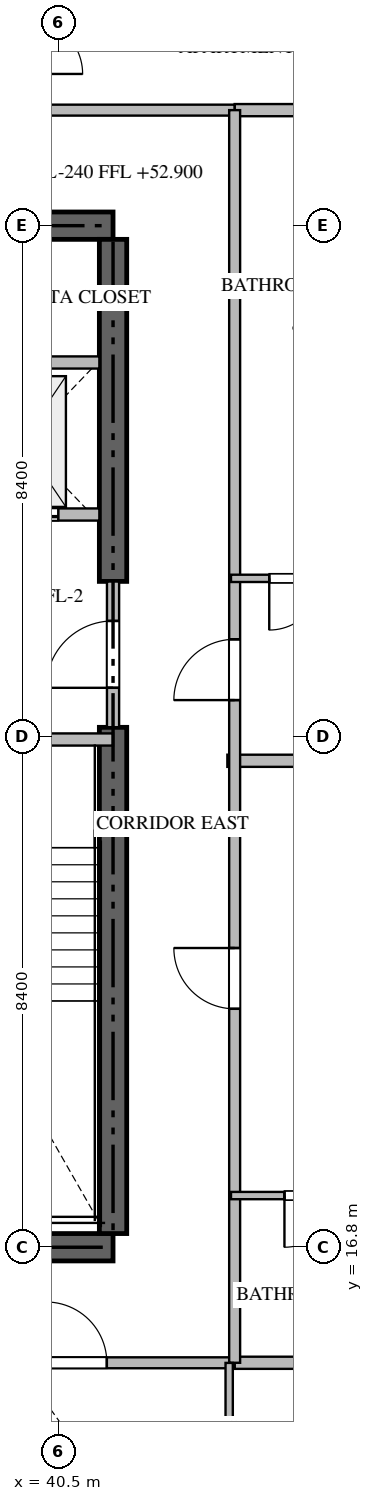
"""IFC4 building model, lengths in metres.
Left out: names, types, materials, properties, quantities, classifications, styles, units other than length and angle.
Written with IfcOpenShell. Run it as: python <this file> out.ifc"""

import sys

from ifc_helpers import new_model, si_unit, direction, frame, frame_2d, origin, place, context, subcontext, project, spatial, rectangle, extrude, source, transform, mapped, element, fill, save


model = new_model("IFC4")
c1 = context("Model", 3, precision=1e-05, world=origin(), true_north=direction((0.0, 1.0)))
c2 = subcontext(c1, "Body", "Model", "MODEL_VIEW")
j1 = project(units=[si_unit("LENGTHUNIT", "METRE"), si_unit("PLANEANGLEUNIT", "RADIAN")], contexts=[c1])
p1 = place(None, origin())
s1 = spatial("IfcSite", under=j1, at=p1, CompositionType="ELEMENT")
p2 = place(p1, origin())
s2 = spatial("IfcBuilding", under=s1, at=p2, CompositionType="ELEMENT")
p3 = place(p2, frame((0.0, 0.0, 52.95)))
s3 = spatial("IfcBuildingStorey", under=s2, at=p3, CompositionType="ELEMENT", Elevation=52.95)
for number, where, z_axis, x_axis in (
    (1, (23.4, 16.8, -0.26), (0.0, 0.0, 1.0), (1.0, 0.0, 0.0)),
    (2, (41.4, 33.6, -0.26), (0.0, 0.0, 1.0), (-1.0, 0.0, 0.0)),
):
    element("IfcWall", number, at=place(p3, frame(where, z_axis=z_axis, x_axis=x_axis)), inside=s3, PredefinedType="SHEAR", context=c2, shape_type="SweptSolid", body=[
        extrude(rectangle(XDim=18.0, YDim=0.45, at=frame_2d((9.0, 0.0))), origin(), (0.0, 0.0, 1.0), 3.748),
    ])
p4 = place(p3, frame((41.4, 17.025, -0.26), z_axis=(0.0, 0.0, 1.0), x_axis=(0.0, 1.0, 0.0)))
e3 = element("IfcWall", 3, at=p4, inside=s3, PredefinedType="SHEAR", context=c2, shape_type="SweptSolid", body=[
    extrude(rectangle(XDim=8.325, YDim=0.45, at=frame_2d((4.163, 0.0))), origin(), (0.0, 0.0, 1.0), 3.748),
])
p5 = place(p3, frame((41.4, 27.75, -0.26), z_axis=(0.0, 0.0, 1.0), x_axis=(0.0, 1.0, 0.0)))
e4 = element("IfcWall", 4, at=p5, inside=s3, PredefinedType="SHEAR", context=c2, shape_type="SweptSolid", body=[
    extrude(rectangle(XDim=5.625, YDim=0.45, at=frame_2d((2.812, 0.0))), origin(), (0.0, 0.0, 1.0), 3.748),
])
p6 = place(p3, frame((36.95, 25.15, 0.0), z_axis=(0.0, 0.0, 1.0), x_axis=(1.0, 0.0, 0.0)))
e5 = element("IfcWall", 5, at=p6, inside=s3, PredefinedType="STANDARD", context=c2, shape_type="SweptSolid", body=[
    extrude(rectangle(XDim=4.45, YDim=0.2, at=frame_2d((2.225, 0.0))), origin(), (0.0, 0.0, 1.0), 3.49),
])
p7 = place(p6, frame((1.65, 0.0, 0.0)))
e6 = element("IfcOpeningElement", 6, at=p7, cuts=e5, PredefinedType="OPENING", context=c2, shape_type="SweptSolid", body=[
    extrude(rectangle(XDim=1.1, YDim=2.15, at=frame_2d((0.55, 1.075))), frame((0.0, 0.11, 0.0), z_axis=(0.0, -1.0, 0.0), x_axis=(1.0, 0.0, 0.0)), (0.0, 0.0, 1.0), 0.22),
])
p8 = place(p3, frame((38.75, 28.85, 0.0), z_axis=(0.0, 0.0, 1.0), x_axis=(1.0, 0.0, 0.0)))
e7 = element("IfcWall", 7, at=p8, inside=s3, PredefinedType="STANDARD", context=c2, shape_type="SweptSolid", body=[
    extrude(rectangle(XDim=2.425, YDim=0.2, at=frame_2d((1.212, 0.0))), origin(), (0.0, 0.0, 1.0), 3.49),
])
p9 = place(p8, frame((0.55, 0.0, 0.0)))
e8 = element("IfcOpeningElement", 8, at=p9, cuts=e7, PredefinedType="OPENING", context=c2, shape_type="SweptSolid", body=[
    extrude(rectangle(XDim=1.2, YDim=2.2, at=frame_2d((0.6, 1.1))), frame((0.0, 0.11, 0.0), z_axis=(0.0, -1.0, 0.0), x_axis=(1.0, 0.0, 0.0)), (0.0, 0.0, 1.0), 0.22),
])
p10 = place(p3, frame((38.75, 31.35, 0.0), z_axis=(0.0, 0.0, 1.0), x_axis=(1.0, 0.0, 0.0)))
e9 = element("IfcWall", 9, at=p10, inside=s3, PredefinedType="STANDARD", context=c2, shape_type="SweptSolid", body=[
    extrude(rectangle(XDim=2.425, YDim=0.2, at=frame_2d((1.212, 0.0))), origin(), (0.0, 0.0, 1.0), 3.49),
])
p11 = place(p3, frame((41.4, 25.352, 0.0), z_axis=(0.0, 0.0, 1.0), x_axis=(0.0, 1.0, 0.0)))
e10 = element("IfcWall", 10, at=p11, inside=s3, PredefinedType="STANDARD", context=c2, shape_type="SweptSolid", body=[
    extrude(rectangle(XDim=2.396, YDim=0.2, at=frame_2d((1.198, 0.0))), origin(), (0.0, 0.0, 1.0), 3.49),
])
p12 = place(p11, frame((0.648, 0.0, 0.0)))
e11 = element("IfcOpeningElement", 11, at=p12, cuts=e10, PredefinedType="OPENING", context=c2, shape_type="SweptSolid", body=[
    extrude(rectangle(XDim=1.1, YDim=2.15, at=frame_2d((0.55, 1.075))), frame((0.0, 0.11, 0.0), z_axis=(0.0, -1.0, 0.0), x_axis=(1.0, 0.0, 0.0)), (0.0, 0.0, 1.0), 0.22),
])
p13 = place(p3, frame((43.28, 24.8, 0.0), z_axis=(0.0, 0.0, 1.0), x_axis=(1.0, 0.0, 0.0)))
e12 = element("IfcWall", 12, at=p13, inside=s3, PredefinedType="PARTITIONING", context=c2, shape_type="SweptSolid", body=[
    extrude(rectangle(XDim=15.438, YDim=0.2, at=frame_2d((7.719, 0.0))), origin(), (0.0, 0.0, 1.0), 3.49),
])
for number, where, z_axis, x_axis in (
    (13, (43.4, 14.9, 0.0), (0.0, 0.0, 1.0), (1.0, 0.0, 0.0)),
    (14, (43.4, 35.5, 0.0), (0.0, 0.0, 1.0), (1.0, 0.0, 0.0)),
):
    element("IfcWall", number, at=place(p3, frame(where, z_axis=z_axis, x_axis=x_axis)), inside=s3, PredefinedType="PARTITIONING", context=c2, shape_type="SweptSolid", body=[
        extrude(rectangle(XDim=15.318, YDim=0.2, at=frame_2d((7.659, 0.0))), origin(), (0.0, 0.0, 1.0), 3.49),
    ])
p14 = place(p3, frame((21.402, 14.9, 0.0), z_axis=(0.0, 0.0, 1.0), x_axis=(1.0, 0.0, 0.0)))
e15 = element("IfcWall", 15, at=p14, inside=s3, PredefinedType="PARTITIONING", context=c2, shape_type="SweptSolid", body=[
    extrude(rectangle(XDim=21.996, YDim=0.18, at=frame_2d((10.998, 0.0))), origin(), (0.0, 0.0, 1.0), 3.49),
])
p15 = place(p14, frame((2.1, 0.0, 0.0)))
e16 = element("IfcOpeningElement", 16, at=p15, cuts=e15, PredefinedType="OPENING", context=c2, shape_type="SweptSolid", body=[
    extrude(rectangle(XDim=1.0, YDim=2.15, at=frame_2d((0.5, 1.075))), frame((0.0, 0.1, 0.0), z_axis=(0.0, -1.0, 0.0), x_axis=(1.0, 0.0, 0.0)), (0.0, 0.0, 1.0), 0.2),
])
p16 = place(p14, frame((14.172, 0.0, 0.0)))
e17 = element("IfcOpeningElement", 17, at=p16, cuts=e15, PredefinedType="OPENING", context=c2, shape_type="SweptSolid", body=[
    extrude(rectangle(XDim=1.0, YDim=2.15, at=frame_2d((0.5, 1.075))), frame((0.0, 0.1, 0.0), z_axis=(0.0, -1.0, 0.0), x_axis=(1.0, 0.0, 0.0)), (0.0, 0.0, 1.0), 0.2),
])
p17 = place(p14, frame((18.896, 0.0, 0.0)))
e18 = element("IfcOpeningElement", 18, at=p17, cuts=e15, PredefinedType="OPENING", context=c2, shape_type="SweptSolid", body=[
    extrude(rectangle(XDim=1.0, YDim=2.15, at=frame_2d((0.5, 1.075))), frame((0.0, 0.1, 0.0), z_axis=(0.0, -1.0, 0.0), x_axis=(1.0, 0.0, 0.0)), (0.0, 0.0, 1.0), 0.2),
])
p18 = place(p3, frame((21.402, 35.5, 0.0), z_axis=(0.0, 0.0, 1.0), x_axis=(1.0, 0.0, 0.0)))
e19 = element("IfcWall", 19, at=p18, inside=s3, PredefinedType="PARTITIONING", context=c2, shape_type="SweptSolid", body=[
    extrude(rectangle(XDim=21.996, YDim=0.18, at=frame_2d((10.998, 0.0))), origin(), (0.0, 0.0, 1.0), 3.49),
])
p19 = place(p18, frame((15.222, 0.0, 0.0)))
e20 = element("IfcOpeningElement", 20, at=p19, cuts=e19, PredefinedType="OPENING", context=c2, shape_type="SweptSolid", body=[
    extrude(rectangle(XDim=1.0, YDim=2.15, at=frame_2d((0.5, 1.075))), frame((0.0, 0.1, 0.0), z_axis=(0.0, -1.0, 0.0), x_axis=(1.0, 0.0, 0.0)), (0.0, 0.0, 1.0), 0.2),
])
p20 = place(p3, frame((43.4, 14.9, 0.0), z_axis=(0.0, 0.0, 1.0), x_axis=(0.0, 1.0, 0.0)))
e21 = element("IfcWall", 21, at=p20, inside=s3, PredefinedType="PARTITIONING", context=c2, shape_type="SweptSolid", body=[
    extrude(rectangle(XDim=20.6, YDim=0.18, at=frame_2d((10.3, 0.0))), origin(), (0.0, 0.0, 1.0), 3.49),
])
p21 = place(p20, frame((5.821, 0.0, 0.0)))
e22 = element("IfcOpeningElement", 22, at=p21, cuts=e21, PredefinedType="OPENING", context=c2, shape_type="SweptSolid", body=[
    extrude(rectangle(XDim=1.0, YDim=2.15, at=frame_2d((0.5, 1.075))), frame((0.0, 0.1, 0.0), z_axis=(0.0, -1.0, 0.0), x_axis=(1.0, 0.0, 0.0)), (0.0, 0.0, 1.0), 0.2),
])
p22 = place(p20, frame((10.898, 0.0, 0.0)))
e23 = element("IfcOpeningElement", 23, at=p22, cuts=e21, PredefinedType="OPENING", context=c2, shape_type="SweptSolid", body=[
    extrude(rectangle(XDim=1.0, YDim=2.15, at=frame_2d((0.5, 1.075))), frame((0.0, 0.1, 0.0), z_axis=(0.0, -1.0, 0.0), x_axis=(1.0, 0.0, 0.0)), (0.0, 0.0, 1.0), 0.2),
])
p23 = place(p3, frame((43.31, 12.15, 0.0), z_axis=(0.0, 0.0, 1.0), x_axis=(0.0, 1.0, 0.0)))
e24 = element("IfcWall", 24, at=p23, inside=s3, PredefinedType="PARTITIONING", context=c2, shape_type="SweptSolid", body=[
    extrude(rectangle(XDim=2.748, YDim=0.12, at=frame_2d((1.374, 0.0))), origin(), (0.0, 0.0, 1.0), 3.49),
])
p24 = place(p3, frame((45.948, 17.65, 0.0), z_axis=(0.0, 0.0, 1.0), x_axis=(-1.0, 0.0, 0.0)))
e25 = element("IfcWall", 25, at=p24, inside=s3, PredefinedType="PARTITIONING", context=c2, shape_type="SweptSolid", body=[
    extrude(rectangle(XDim=2.608, YDim=0.12, at=frame_2d((1.304, 0.0))), origin(), (0.0, 0.0, 1.0), 3.49),
])
p25 = place(p24, frame((0.879, 0.0, 0.0)))
e26 = element("IfcOpeningElement", 26, at=p25, cuts=e25, PredefinedType="OPENING", context=c2, shape_type="SweptSolid", body=[
    extrude(rectangle(XDim=0.85, YDim=2.1, at=frame_2d((0.425, 1.05))), frame((0.0, 0.07, 0.0), z_axis=(0.0, -1.0, 0.0), x_axis=(1.0, 0.0, 0.0)), (0.0, 0.0, 1.0), 0.14),
])
p26 = place(p3, frame((45.448, 27.8, 0.0), z_axis=(0.0, 0.0, 1.0), x_axis=(-1.0, 0.0, 0.0)))
e27 = element("IfcWall", 27, at=p26, inside=s3, PredefinedType="PARTITIONING", context=c2, shape_type="SweptSolid", body=[
    extrude(rectangle(XDim=2.108, YDim=0.12, at=frame_2d((1.054, 0.0))), origin(), (0.0, 0.0, 1.0), 3.49),
])
p27 = place(p26, frame((0.629, 0.0, 0.0)))
e28 = element("IfcOpeningElement", 28, at=p27, cuts=e27, PredefinedType="OPENING", context=c2, shape_type="SweptSolid", body=[
    extrude(rectangle(XDim=0.85, YDim=2.1, at=frame_2d((0.425, 1.05))), frame((0.0, 0.07, 0.0), z_axis=(0.0, -1.0, 0.0), x_axis=(1.0, 0.0, 0.0)), (0.0, 0.0, 1.0), 0.14),
])
m1 = source(origin(), c2, "Body", "SweptSolid", [
    extrude(rectangle(XDim=1.2, YDim=2.2, at=frame_2d((0.6, 1.1))), frame((0.0, 0.025, 0.0), z_axis=(0.0, -1.0, 0.0), x_axis=(1.0, 0.0, 0.0)), (0.0, 0.0, 1.0), 0.05),
])
p28 = place(p9, origin())
e29 = element("IfcDoor", 29, at=p28, inside=s3, OperationType="DOUBLE_DOOR_SLIDING", PredefinedType="DOOR", context=c2, shape_type="MappedRepresentation", body=[
    mapped(m1, transform((0.0, 0.0, 0.0), scale=1.0)),
])
fill(e8, e29)
m2 = source(origin(), c2, "Body", "SweptSolid", [
    extrude(rectangle(XDim=1.1, YDim=2.15, at=frame_2d((0.55, 1.075))), frame((0.0, 0.025, 0.0), z_axis=(0.0, -1.0, 0.0), x_axis=(1.0, 0.0, 0.0)), (0.0, 0.0, 1.0), 0.05),
])
p29 = place(p12, origin())
e30 = element("IfcDoor", 30, at=p29, inside=s3, OperationType="SINGLE_SWING_LEFT", PredefinedType="DOOR", context=c2, shape_type="MappedRepresentation", body=[
    mapped(m2, transform((0.0, 0.0, 0.0), scale=1.0)),
])
fill(e11, e30)
m3 = source(origin(), c2, "Body", "SweptSolid", [
    extrude(rectangle(XDim=1.0, YDim=2.15, at=frame_2d((0.5, 1.075))), frame((0.0, 0.025, 0.0), z_axis=(0.0, -1.0, 0.0), x_axis=(1.0, 0.0, 0.0)), (0.0, 0.0, 1.0), 0.05),
])
p30 = place(p17, origin())
e31 = element("IfcDoor", 31, at=p30, inside=s3, OperationType="SINGLE_SWING_LEFT", PredefinedType="DOOR", context=c2, shape_type="MappedRepresentation", body=[
    mapped(m3, transform((0.0, 0.0, 0.0), scale=1.0)),
])
fill(e18, e31)
p31 = place(p21, origin())
e32 = element("IfcDoor", 32, at=p31, inside=s3, OperationType="SINGLE_SWING_RIGHT", PredefinedType="DOOR", context=c2, shape_type="MappedRepresentation", body=[
    mapped(m3, transform((0.0, 0.0, 0.0), scale=1.0)),
])
fill(e22, e32)
p32 = place(p22, origin())
e33 = element("IfcDoor", 33, at=p32, inside=s3, OperationType="SINGLE_SWING_LEFT", PredefinedType="DOOR", context=c2, shape_type="MappedRepresentation", body=[
    mapped(m3, transform((0.0, 0.0, 0.0), scale=1.0)),
])
fill(e23, e33)
m4 = source(origin(), c2, "Body", "SweptSolid", [
    extrude(rectangle(XDim=0.85, YDim=2.1, at=frame_2d((0.425, 1.05))), frame((0.0, 0.025, 0.0), z_axis=(0.0, -1.0, 0.0), x_axis=(1.0, 0.0, 0.0)), (0.0, 0.0, 1.0), 0.05),
])
p33 = place(p25, origin())
e34 = element("IfcDoor", 34, at=p33, inside=s3, OperationType="SINGLE_SWING_RIGHT", PredefinedType="DOOR", context=c2, shape_type="MappedRepresentation", body=[
    mapped(m4, transform((0.0, 0.0, 0.0), scale=1.0)),
])
fill(e26, e34)
p34 = place(p27, origin())
e35 = element("IfcDoor", 35, at=p34, inside=s3, OperationType="SINGLE_SWING_RIGHT", PredefinedType="DOOR", context=c2, shape_type="MappedRepresentation", body=[
    mapped(m4, transform((0.0, 0.0, 0.0), scale=1.0)),
])
fill(e28, e35)
save(model, sys.argv[1])
